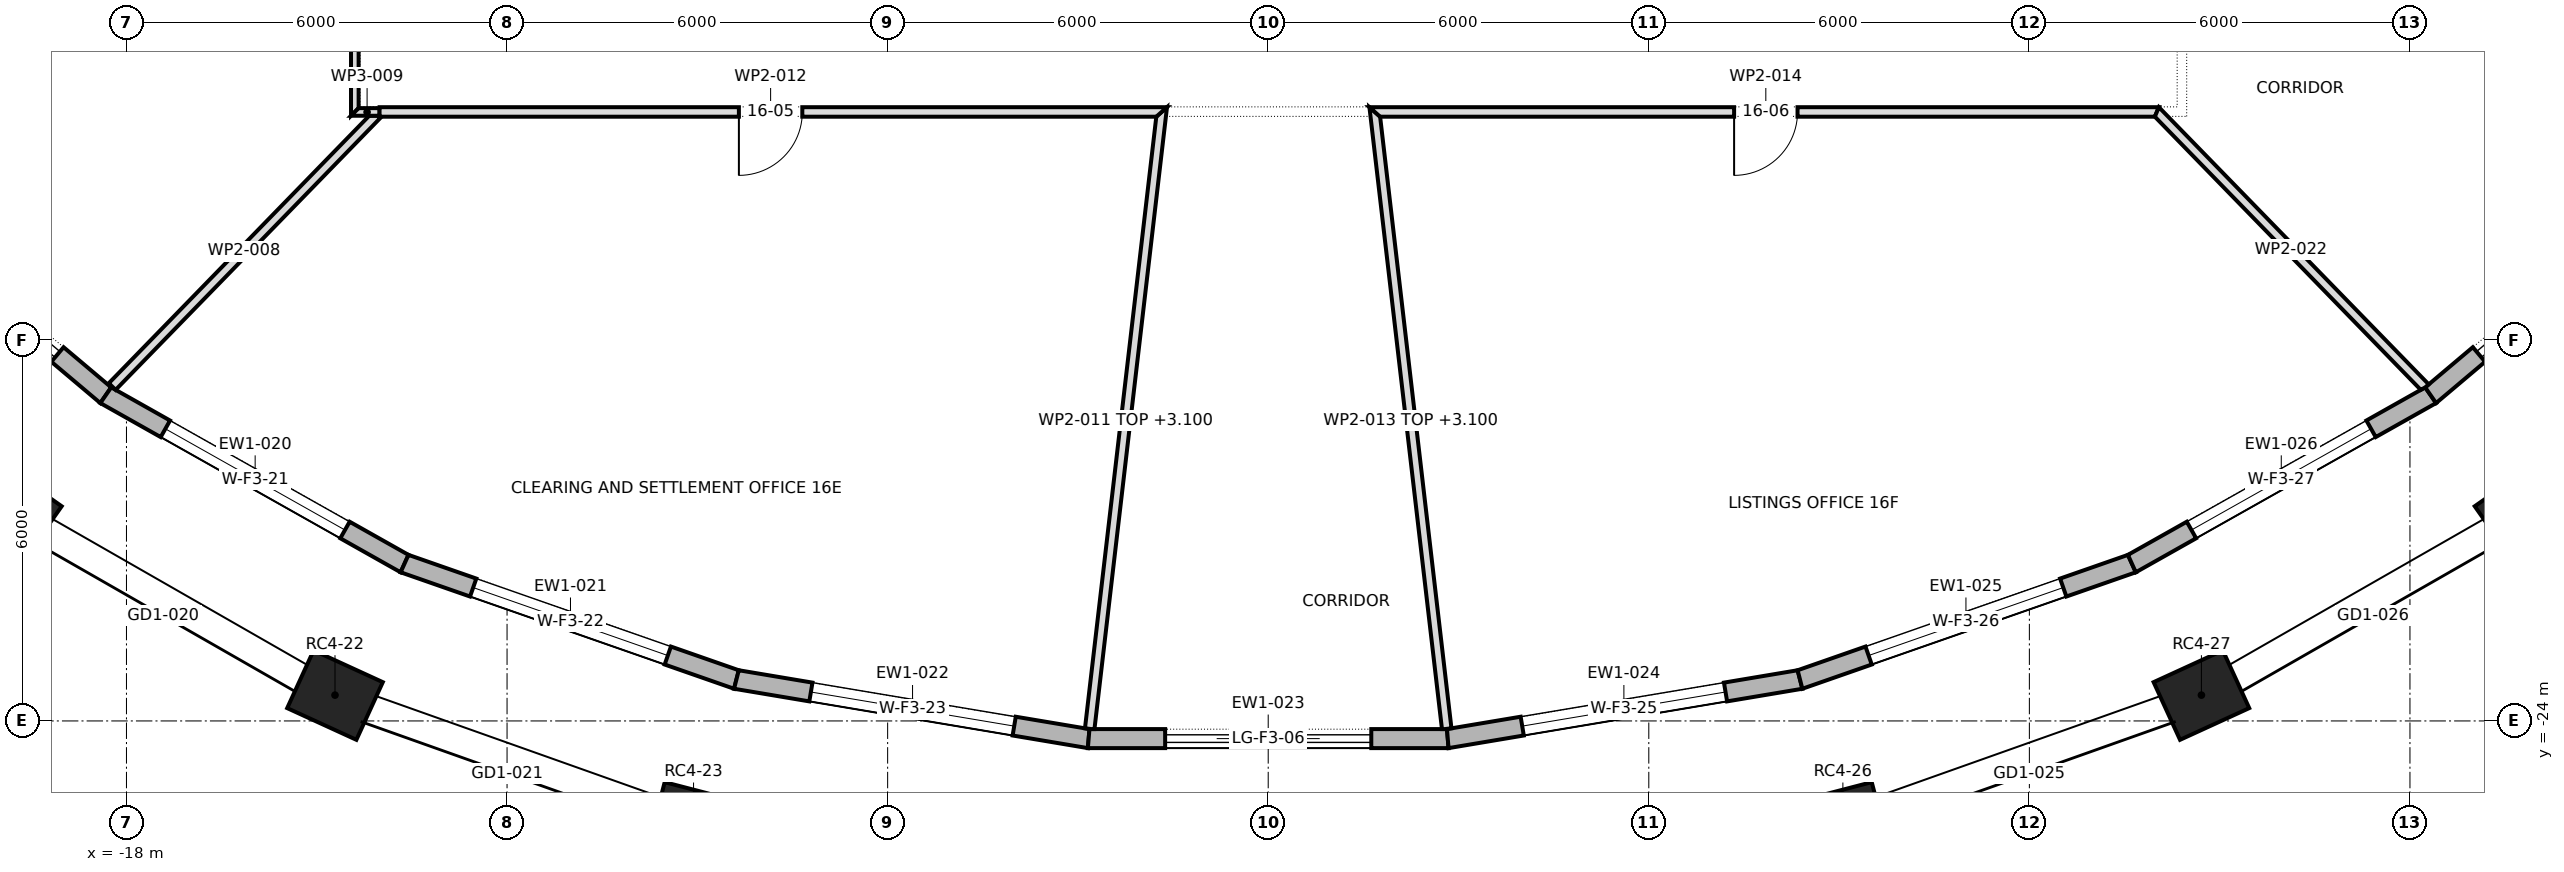
"""IFC4 building model, lengths in metres.
Left out: names, types, materials, properties, quantities, classifications, styles, units other than length and angle.
Written with IfcOpenShell. Run it as: python <this file> out.ifc"""

import sys

from ifc_helpers import new_model, si_unit, direction, frame, frame_2d, origin, origin_2d, place, context, subcontext, project, spatial, polyline, rectangle, outline, extrude, element, fill, save


model = new_model("IFC4")
c1 = context("Model", 3, precision=1e-05, world=origin(), true_north=direction((0.0, 1.0)))
c2 = subcontext(c1, "Body", "Model", "MODEL_VIEW")
j1 = project(units=[si_unit("LENGTHUNIT", "METRE"), si_unit("PLANEANGLEUNIT", "RADIAN")], contexts=[c1])
p1 = place(None, origin())
s1 = spatial("IfcSite", under=j1, at=p1, CompositionType="ELEMENT")
p2 = place(p1, origin())
s2 = spatial("IfcBuilding", under=s1, at=p2, CompositionType="ELEMENT")
p3 = place(p2, frame((0.0, 0.0, 234.9)))
s3 = spatial("IfcBuildingStorey", under=s2, at=p3, CompositionType="ELEMENT", Elevation=234.9)
for number, where, z_axis, x_axis in (
    (1, (-19.8, -20.679, 0.0), (0.0, 0.0, 1.0), (0.818, -0.575, 0.0)),
    (2, (-14.712, -23.593, 0.0), (0.0, 0.0, 1.0), (0.909, -0.417, 0.0)),
    (3, (-9.06, -25.6, 0.0), (0.0, 0.0, 1.0), (0.968, -0.252, 0.0)),
    (4, (9.06, -25.6, 0.0), (0.0, 0.0, 1.0), (0.968, 0.252, 0.0)),
    (5, (14.712, -23.593, 0.0), (0.0, 0.0, 1.0), (0.909, 0.417, 0.0)),
    (6, (19.8, -20.679, 0.0), (0.0, 0.0, 1.0), (0.818, 0.575, 0.0)),
):
    element("IfcColumn", number, at=place(p3, frame(where, z_axis=z_axis, x_axis=x_axis)), inside=s3, PredefinedType="COLUMN", context=c2, shape_type="SweptSolid", body=[
        extrude(rectangle(XDim=1.2, YDim=1.0, at=origin_2d()), origin(), (0.0, 0.0, 1.0), 4.0),
    ])
p4 = place(p3, frame((-22.334, -15.486, 0.0), z_axis=(0.0, 0.0, 1.0), x_axis=(0.764475071601, -0.644653290459, 0.0)))
e7 = element("IfcWall", 7, at=p4, inside=s3, PredefinedType="STANDARD", context=c2, shape_type="SweptSolid", body=[
    extrude(outline(polyline([(-0.015, -0.15), (5.257, -0.15), (5.229, 0.15), (0.015, 0.15), (-0.015, -0.15)])), origin(), (0.0, 0.0, 1.0), 3.7),
])
p5 = place(p4, frame((0.996, 0.0, 0.0)))
e8 = element("IfcOpeningElement", 8, at=p5, cuts=e7, PredefinedType="OPENING", context=c2, shape_type="SweptSolid", body=[
    extrude(rectangle(XDim=3.25, YDim=3.25, at=frame_2d((1.625, 1.625))), frame((0.0, 0.162, 0.0), z_axis=(0.0, -1.0, 0.0), x_axis=(1.0, 0.0, 0.0)), (0.0, 0.0, 1.0), 0.324),
])
p6 = place(p3, frame((-18.326, -18.865, 0.0), z_axis=(0.0, 0.0, 1.0), x_axis=(0.871225596594, -0.490882837181, 0.0)))
e9 = element("IfcWall", 9, at=p6, inside=s3, PredefinedType="STANDARD", context=c2, shape_type="SweptSolid", body=[
    extrude(outline(polyline([(-0.014, -0.15), (5.42, -0.15), (5.393, 0.15), (0.014, 0.15), (-0.014, -0.15)])), origin(), (0.0, 0.0, 1.0), 3.7),
])
p7 = place(p6, frame((1.078, 0.0, 0.6)))
e10 = element("IfcOpeningElement", 10, at=p7, cuts=e9, PredefinedType="OPENING", context=c2, shape_type="SweptSolid", body=[
    extrude(rectangle(XDim=3.25, YDim=2.65, at=frame_2d((1.625, 1.325))), frame((0.0, 0.162, 0.0), z_axis=(0.0, -1.0, 0.0), x_axis=(1.0, 0.0, 0.0)), (0.0, 0.0, 1.0), 0.324),
])
p8 = place(p3, frame((-13.616, -21.52, 0.0), z_axis=(0.0, 0.0, 1.0), x_axis=(0.944075859918, -0.329728328659, 0.0)))
e11 = element("IfcWall", 11, at=p8, inside=s3, PredefinedType="STANDARD", context=c2, shape_type="SweptSolid", body=[
    extrude(outline(polyline([(-0.013, -0.15), (5.555, -0.15), (5.53, 0.15), (0.013, 0.15), (-0.013, -0.15)])), origin(), (0.0, 0.0, 1.0), 3.7),
])
p9 = place(p8, frame((1.146, 0.0, 0.6)))
e12 = element("IfcOpeningElement", 12, at=p9, cuts=e11, PredefinedType="OPENING", context=c2, shape_type="SweptSolid", body=[
    extrude(rectangle(XDim=3.25, YDim=2.65, at=frame_2d((1.625, 1.325))), frame((0.0, 0.162, 0.0), z_axis=(0.0, -1.0, 0.0), x_axis=(1.0, 0.0, 0.0)), (0.0, 0.0, 1.0), 0.324),
])
p10 = place(p3, frame((-8.384, -23.347, 0.0), z_axis=(0.0, 0.0, 1.0), x_axis=(0.986223472554, -0.165418445715, 0.0)))
e13 = element("IfcWall", 13, at=p10, inside=s3, PredefinedType="STANDARD", context=c2, shape_type="SweptSolid", body=[
    extrude(outline(polyline([(-0.013, -0.15), (5.643, -0.15), (5.618, 0.15), (0.013, 0.15), (-0.013, -0.15)])), origin(), (0.0, 0.0, 1.0), 3.7),
])
p11 = place(p10, frame((1.19, 0.0, 0.6)))
e14 = element("IfcOpeningElement", 14, at=p11, cuts=e13, PredefinedType="OPENING", context=c2, shape_type="SweptSolid", body=[
    extrude(rectangle(XDim=3.25, YDim=2.65, at=frame_2d((1.625, 1.325))), frame((0.0, 0.162, 0.0), z_axis=(0.0, -1.0, 0.0), x_axis=(1.0, 0.0, 0.0)), (0.0, 0.0, 1.0), 0.324),
])
p12 = place(p3, frame((-2.831, -24.278, 0.0), z_axis=(0.0, 0.0, 1.0), x_axis=(1.0, 0.0, 0.0)))
e15 = element("IfcWall", 15, at=p12, inside=s3, PredefinedType="STANDARD", context=c2, shape_type="SweptSolid", body=[
    extrude(outline(polyline([(-0.012, -0.15), (5.674, -0.15), (5.649, 0.15), (0.012, 0.15), (-0.012, -0.15)])), origin(), (0.0, 0.0, 1.0), 3.7),
])
p13 = place(p12, frame((1.206, 0.0, 0.0)))
e16 = element("IfcOpeningElement", 16, at=p13, cuts=e15, PredefinedType="OPENING", context=c2, shape_type="SweptSolid", body=[
    extrude(rectangle(XDim=3.25, YDim=3.25, at=frame_2d((1.625, 1.625))), frame((0.0, 0.162, 0.0), z_axis=(0.0, -1.0, 0.0), x_axis=(1.0, 0.0, 0.0)), (0.0, 0.0, 1.0), 0.324),
])
p14 = place(p3, frame((2.831, -24.278, 0.0), z_axis=(0.0, 0.0, 1.0), x_axis=(0.986223472554, 0.165418445715, 0.0)))
e17 = element("IfcWall", 17, at=p14, inside=s3, PredefinedType="STANDARD", context=c2, shape_type="SweptSolid", body=[
    extrude(outline(polyline([(-0.012, -0.15), (5.643, -0.15), (5.618, 0.15), (0.012, 0.15), (-0.012, -0.15)])), origin(), (0.0, 0.0, 1.0), 3.7),
])
p15 = place(p14, frame((1.19, 0.0, 0.6)))
e18 = element("IfcOpeningElement", 18, at=p15, cuts=e17, PredefinedType="OPENING", context=c2, shape_type="SweptSolid", body=[
    extrude(rectangle(XDim=3.25, YDim=2.65, at=frame_2d((1.625, 1.325))), frame((0.0, 0.162, 0.0), z_axis=(0.0, -1.0, 0.0), x_axis=(1.0, 0.0, 0.0)), (0.0, 0.0, 1.0), 0.324),
])
p16 = place(p3, frame((8.384, -23.347, 0.0), z_axis=(0.0, 0.0, 1.0), x_axis=(0.944075859918, 0.329728328659, 0.0)))
e19 = element("IfcWall", 19, at=p16, inside=s3, PredefinedType="STANDARD", context=c2, shape_type="SweptSolid", body=[
    extrude(outline(polyline([(-0.013, -0.15), (5.556, -0.15), (5.529, 0.15), (0.013, 0.15), (-0.013, -0.15)])), origin(), (0.0, 0.0, 1.0), 3.7),
])
p17 = place(p16, frame((1.146, 0.0, 0.6)))
e20 = element("IfcOpeningElement", 20, at=p17, cuts=e19, PredefinedType="OPENING", context=c2, shape_type="SweptSolid", body=[
    extrude(rectangle(XDim=3.25, YDim=2.65, at=frame_2d((1.625, 1.325))), frame((0.0, 0.162, 0.0), z_axis=(0.0, -1.0, 0.0), x_axis=(1.0, 0.0, 0.0)), (0.0, 0.0, 1.0), 0.324),
])
p18 = place(p3, frame((13.616, -21.52, 0.0), z_axis=(0.0, 0.0, 1.0), x_axis=(0.871225596594, 0.490882837181, 0.0)))
e21 = element("IfcWall", 21, at=p18, inside=s3, PredefinedType="STANDARD", context=c2, shape_type="SweptSolid", body=[
    extrude(outline(polyline([(-0.013, -0.15), (5.421, -0.15), (5.393, 0.15), (0.013, 0.15), (-0.013, -0.15)])), origin(), (0.0, 0.0, 1.0), 3.7),
])
p19 = place(p18, frame((1.078, 0.0, 0.6)))
e22 = element("IfcOpeningElement", 22, at=p19, cuts=e21, PredefinedType="OPENING", context=c2, shape_type="SweptSolid", body=[
    extrude(rectangle(XDim=3.25, YDim=2.65, at=frame_2d((1.625, 1.325))), frame((0.0, 0.162, 0.0), z_axis=(0.0, -1.0, 0.0), x_axis=(1.0, 0.0, 0.0)), (0.0, 0.0, 1.0), 0.324),
])
p20 = place(p3, frame((18.326, -18.865, 0.0), z_axis=(0.0, 0.0, 1.0), x_axis=(0.764475071601, 0.644653290459, 0.0)))
e23 = element("IfcWall", 23, at=p20, inside=s3, PredefinedType="STANDARD", context=c2, shape_type="SweptSolid", body=[
    extrude(outline(polyline([(-0.014, -0.15), (5.258, -0.15), (5.228, 0.15), (0.014, 0.15), (-0.014, -0.15)])), origin(), (0.0, 0.0, 1.0), 3.7),
])
p21 = place(p20, frame((0.996, 0.0, 0.0)))
e24 = element("IfcOpeningElement", 24, at=p21, cuts=e23, PredefinedType="OPENING", context=c2, shape_type="SweptSolid", body=[
    extrude(rectangle(XDim=3.25, YDim=3.25, at=frame_2d((1.625, 1.625))), frame((0.0, 0.162, 0.0), z_axis=(0.0, -1.0, 0.0), x_axis=(1.0, 0.0, 0.0)), (0.0, 0.0, 1.0), 0.324),
])
p22 = place(p3, frame((-14.4, -14.46, 0.0), z_axis=(0.0, 0.0, 1.0), x_axis=(0.0, 1.0, 0.0)))
e25 = element("IfcWall", 25, at=p22, inside=s3, PredefinedType="PARTITIONING", context=c2, shape_type="SweptSolid", body=[
    extrude(outline(polyline([(7.97, 0.06), (5.978, 0.06), (3.985, 0.06), (1.992, 0.06), (0.0, 0.06), (0.12, -0.06), (2.083, -0.06), (4.045, -0.06), (6.008, -0.06), (7.97, -0.06), (7.97, 0.06)])), origin(), (0.0, 0.0, 1.0), 3.7),
])
p23 = place(p22, frame((3.515, 0.0, 0.0)))
e26 = element("IfcOpeningElement", 26, at=p23, cuts=e25, PredefinedType="OPENING", context=c2, shape_type="SweptSolid", body=[
    extrude(rectangle(XDim=1.0, YDim=2.1, at=frame_2d((0.5, 1.05))), frame((0.0, 0.072, 0.0), z_axis=(0.0, -1.0, 0.0), x_axis=(1.0, 0.0, 0.0)), (0.0, 0.0, 1.0), 0.144),
])
p24 = place(p3, frame((-14.032, -14.423, 0.0), z_axis=(0.0, 0.0, 1.0), x_axis=(-0.697618878337, -0.716469050684, 0.0)))
e27 = element("IfcWall", 27, at=p24, inside=s3, PredefinedType="PARTITIONING", context=c2, shape_type="SweptSolid", body=[
    extrude(outline(polyline([(0.0, 0.075), (0.0, 0.075), (0.022, 0.052), (0.011, 0.042), (0.125, -0.075), (2.086, -0.075), (4.048, -0.075), (6.01, -0.075), (6.01, 0.075), (4.507, 0.075), (3.005, 0.075), (1.502, 0.075), (0.0, 0.075)])), origin(), (0.0, 0.0, 1.0), 3.7),
])
p25 = place(p3, frame((-14.01, -14.4, 0.0), z_axis=(0.0, 0.0, 1.0), x_axis=(-1.0, 0.0, 0.0)))
e28 = element("IfcWall", 28, at=p25, inside=s3, PredefinedType="PARTITIONING", context=c2, shape_type="SweptSolid", body=[
    extrude(outline(polyline([(0.0, -0.06), (0.33, -0.06), (0.45, 0.06), (0.0, 0.06), (0.0, -0.06)])), origin(), (0.0, 0.0, 1.0), 3.7),
])
p26 = place(p3, frame((-2.814, -24.125, 0.0), z_axis=(0.0, 0.0, 1.0), x_axis=(0.115875821394, 0.993263708195, 0.0)))
e29 = element("IfcWall", 29, at=p26, inside=s3, PredefinedType="PARTITIONING", context=c2, shape_type="SweptSolid", body=[
    extrude(outline(polyline([(9.875, -0.075), (9.875, -0.075), (9.791, 0.0), (9.707, 0.075), (7.765, 0.075), (5.824, 0.075), (3.883, 0.075), (1.941, 0.075), (0.0, 0.075), (0.0, -0.029), (0.005, -0.075), (1.979, -0.075), (3.953, -0.075), (5.927, -0.075), (7.901, -0.075), (9.875, -0.075)])), origin(), (0.0, 0.0, 1.0), 3.1),
])
p27 = place(p3, frame((-1.596, -14.4, 0.0), z_axis=(0.0, 0.0, 1.0), x_axis=(-1.0, 0.0, 0.0)))
e30 = element("IfcWall", 30, at=p27, inside=s3, PredefinedType="PARTITIONING", context=c2, shape_type="SweptSolid", body=[
    extrude(outline(polyline([(12.414, 0.075), (10.665, 0.075), (8.916, 0.075), (7.166, 0.075), (5.417, 0.075), (3.667, 0.075), (1.918, 0.075), (0.168, 0.075), (0.0, -0.075), (0.0, -0.075), (1.773, -0.075), (3.547, -0.075), (5.32, -0.075), (7.094, -0.075), (8.867, -0.075), (10.641, -0.075), (12.414, -0.075), (12.414, 0.075)])), origin(), (0.0, 0.0, 1.0), 3.7),
])
p28 = place(p27, frame((5.749, 0.0, 0.0)))
e31 = element("IfcOpeningElement", 31, at=p28, cuts=e30, PredefinedType="OPENING", context=c2, shape_type="SweptSolid", body=[
    extrude(rectangle(XDim=1.0, YDim=2.1, at=frame_2d((0.5, 1.05))), frame((0.0, 0.087, 0.0), z_axis=(0.0, -1.0, 0.0), x_axis=(1.0, 0.0, 0.0)), (0.0, 0.0, 1.0), 0.174),
])
p29 = place(p3, frame((1.67, -14.316, 0.0), z_axis=(0.0, 0.0, 1.0), x_axis=(0.115875821394, -0.993263708195, 0.0)))
e32 = element("IfcWall", 32, at=p29, inside=s3, PredefinedType="PARTITIONING", context=c2, shape_type="SweptSolid", body=[
    extrude(outline(polyline([(0.0, -0.075), (1.974, -0.075), (3.948, -0.075), (5.922, -0.075), (7.896, -0.075), (9.87, -0.075), (9.875, -0.03), (9.875, 0.075), (7.934, 0.075), (5.992, 0.075), (4.051, 0.075), (2.11, 0.075), (0.168, 0.075), (0.084, 0.0), (0.0, -0.075), (0.0, -0.075)])), origin(), (0.0, 0.0, 1.0), 3.1),
])
p30 = place(p3, frame((14.042, -14.4, 0.0), z_axis=(0.0, 0.0, 1.0), x_axis=(-1.0, 0.0, 0.0)))
e33 = element("IfcWall", 33, at=p30, inside=s3, PredefinedType="PARTITIONING", context=c2, shape_type="SweptSolid", body=[
    extrude(outline(polyline([(12.446, -0.075), (12.446, -0.075), (12.278, 0.075), (10.533, 0.075), (8.788, 0.075), (7.043, 0.075), (5.298, 0.075), (3.553, 0.075), (1.808, 0.075), (0.063, 0.075), (0.0, -0.075), (1.778, -0.075), (3.556, -0.075), (5.334, -0.075), (7.112, -0.075), (8.89, -0.075), (10.668, -0.075), (12.446, -0.075)])), origin(), (0.0, 0.0, 1.0), 3.7),
])
p31 = place(p30, frame((5.697, 0.0, 0.0)))
e34 = element("IfcOpeningElement", 34, at=p31, cuts=e33, PredefinedType="OPENING", context=c2, shape_type="SweptSolid", body=[
    extrude(rectangle(XDim=1.0, YDim=2.1, at=frame_2d((0.5, 1.05))), frame((0.0, 0.087, 0.0), z_axis=(0.0, -1.0, 0.0), x_axis=(1.0, 0.0, 0.0)), (0.0, 0.0, 1.0), 0.174),
])
p32 = place(p3, frame((18.242, -18.747, 0.0), z_axis=(0.0, 0.0, 1.0), x_axis=(-0.697616683155, 0.716471188105, 0.0)))
e35 = element("IfcWall", 35, at=p32, inside=s3, PredefinedType="PARTITIONING", context=c2, shape_type="SweptSolid", body=[
    extrude(outline(polyline([(0.0, -0.075), (1.525, -0.075), (3.049, -0.075), (4.574, -0.075), (6.099, -0.075), (6.067, 0.0), (6.035, 0.075), (4.533, 0.075), (3.031, 0.075), (1.528, 0.075), (0.025, 0.075), (0.005, -0.002), (0.0, -0.072), (0.0, -0.075)])), origin(), (0.0, 0.0, 1.0), 3.7),
])
p33 = place(p3, frame((18.428, -12.76, 0.0), z_axis=(0.0, 0.0, 1.0), x_axis=(0.822939262801, -0.568129360041, 0.0)))
e36 = element("IfcWall", 36, at=p33, inside=s3, PredefinedType="PARTITIONING", context=c2, shape_type="SweptSolid", body=[
    extrude(outline(polyline([(0.0, -0.075), (1.531, -0.075), (3.063, -0.075), (4.594, -0.075), (4.615, 0.0), (4.619, 0.068), (4.619, 0.075), (3.079, 0.075), (1.54, 0.075), (0.0, 0.075), (0.0, 0.038), (0.001, 0.037), (0.0, 0.036), (0.0, -0.075)])), origin(), (0.0, 0.0, 1.0), 3.7),
])
p34 = place(p5, origin())
e37 = element("IfcDoor", 37, at=p34, inside=s3, OperationType="DOUBLE_DOOR_SLIDING", PredefinedType="DOOR", context=c2, shape_type="SweptSolid", body=[
    extrude(rectangle(XDim=3.25, YDim=3.25, at=frame_2d((1.625, 1.625))), frame((0.0, 0.025, 0.0), z_axis=(0.0, -1.0, 0.0), x_axis=(1.0, 0.0, 0.0)), (0.0, 0.0, 1.0), 0.05),
])
fill(e8, e37)
p35 = place(p7, origin())
e38 = element("IfcWindow", 38, at=p35, inside=s3, PartitioningType="TRIPLE_PANEL_VERTICAL", PredefinedType="WINDOW", context=c2, shape_type="SweptSolid", body=[
    extrude(rectangle(XDim=3.25, YDim=2.65, at=frame_2d((1.625, 1.325))), frame((0.0, 0.03, 0.0), z_axis=(0.0, -1.0, 0.0), x_axis=(1.0, 0.0, 0.0)), (0.0, 0.0, 1.0), 0.06),
])
fill(e10, e38)
p36 = place(p9, origin())
e39 = element("IfcWindow", 39, at=p36, inside=s3, PartitioningType="TRIPLE_PANEL_VERTICAL", PredefinedType="WINDOW", context=c2, shape_type="SweptSolid", body=[
    extrude(rectangle(XDim=3.25, YDim=2.65, at=frame_2d((1.625, 1.325))), frame((0.0, 0.03, 0.0), z_axis=(0.0, -1.0, 0.0), x_axis=(1.0, 0.0, 0.0)), (0.0, 0.0, 1.0), 0.06),
])
fill(e12, e39)
p37 = place(p11, origin())
e40 = element("IfcWindow", 40, at=p37, inside=s3, PartitioningType="TRIPLE_PANEL_VERTICAL", PredefinedType="WINDOW", context=c2, shape_type="SweptSolid", body=[
    extrude(rectangle(XDim=3.25, YDim=2.65, at=frame_2d((1.625, 1.325))), frame((0.0, 0.03, 0.0), z_axis=(0.0, -1.0, 0.0), x_axis=(1.0, 0.0, 0.0)), (0.0, 0.0, 1.0), 0.06),
])
fill(e14, e40)
p38 = place(p13, origin())
e41 = element("IfcDoor", 41, at=p38, inside=s3, OperationType="DOUBLE_DOOR_SLIDING", PredefinedType="DOOR", context=c2, shape_type="SweptSolid", body=[
    extrude(rectangle(XDim=3.25, YDim=3.25, at=frame_2d((1.625, 1.625))), frame((0.0, 0.025, 0.0), z_axis=(0.0, -1.0, 0.0), x_axis=(1.0, 0.0, 0.0)), (0.0, 0.0, 1.0), 0.05),
])
fill(e16, e41)
p39 = place(p15, origin())
e42 = element("IfcWindow", 42, at=p39, inside=s3, PartitioningType="TRIPLE_PANEL_VERTICAL", PredefinedType="WINDOW", context=c2, shape_type="SweptSolid", body=[
    extrude(rectangle(XDim=3.25, YDim=2.65, at=frame_2d((1.625, 1.325))), frame((0.0, 0.03, 0.0), z_axis=(0.0, -1.0, 0.0), x_axis=(1.0, 0.0, 0.0)), (0.0, 0.0, 1.0), 0.06),
])
fill(e18, e42)
p40 = place(p17, origin())
e43 = element("IfcWindow", 43, at=p40, inside=s3, PartitioningType="TRIPLE_PANEL_VERTICAL", PredefinedType="WINDOW", context=c2, shape_type="SweptSolid", body=[
    extrude(rectangle(XDim=3.25, YDim=2.65, at=frame_2d((1.625, 1.325))), frame((0.0, 0.03, 0.0), z_axis=(0.0, -1.0, 0.0), x_axis=(1.0, 0.0, 0.0)), (0.0, 0.0, 1.0), 0.06),
])
fill(e20, e43)
p41 = place(p19, origin())
e44 = element("IfcWindow", 44, at=p41, inside=s3, PartitioningType="TRIPLE_PANEL_VERTICAL", PredefinedType="WINDOW", context=c2, shape_type="SweptSolid", body=[
    extrude(rectangle(XDim=3.25, YDim=2.65, at=frame_2d((1.625, 1.325))), frame((0.0, 0.03, 0.0), z_axis=(0.0, -1.0, 0.0), x_axis=(1.0, 0.0, 0.0)), (0.0, 0.0, 1.0), 0.06),
])
fill(e22, e44)
p42 = place(p21, origin())
e45 = element("IfcDoor", 45, at=p42, inside=s3, OperationType="DOUBLE_DOOR_SLIDING", PredefinedType="DOOR", context=c2, shape_type="SweptSolid", body=[
    extrude(rectangle(XDim=3.25, YDim=3.25, at=frame_2d((1.625, 1.625))), frame((0.0, 0.025, 0.0), z_axis=(0.0, -1.0, 0.0), x_axis=(1.0, 0.0, 0.0)), (0.0, 0.0, 1.0), 0.05),
])
fill(e24, e45)
p43 = place(p28, origin())
e46 = element("IfcDoor", 46, at=p43, inside=s3, OperationType="SINGLE_SWING_LEFT", PredefinedType="DOOR", context=c2, shape_type="SweptSolid", body=[
    extrude(rectangle(XDim=1.0, YDim=2.1, at=frame_2d((0.5, 1.05))), frame((0.0, 0.025, 0.0), z_axis=(0.0, -1.0, 0.0), x_axis=(1.0, 0.0, 0.0)), (0.0, 0.0, 1.0), 0.05),
])
fill(e31, e46)
p44 = place(p31, origin())
e47 = element("IfcDoor", 47, at=p44, inside=s3, OperationType="SINGLE_SWING_LEFT", PredefinedType="DOOR", context=c2, shape_type="SweptSolid", body=[
    extrude(rectangle(XDim=1.0, YDim=2.1, at=frame_2d((0.5, 1.05))), frame((0.0, 0.025, 0.0), z_axis=(0.0, -1.0, 0.0), x_axis=(1.0, 0.0, 0.0)), (0.0, 0.0, 1.0), 0.05),
])
fill(e34, e47)
save(model, sys.argv[1])
